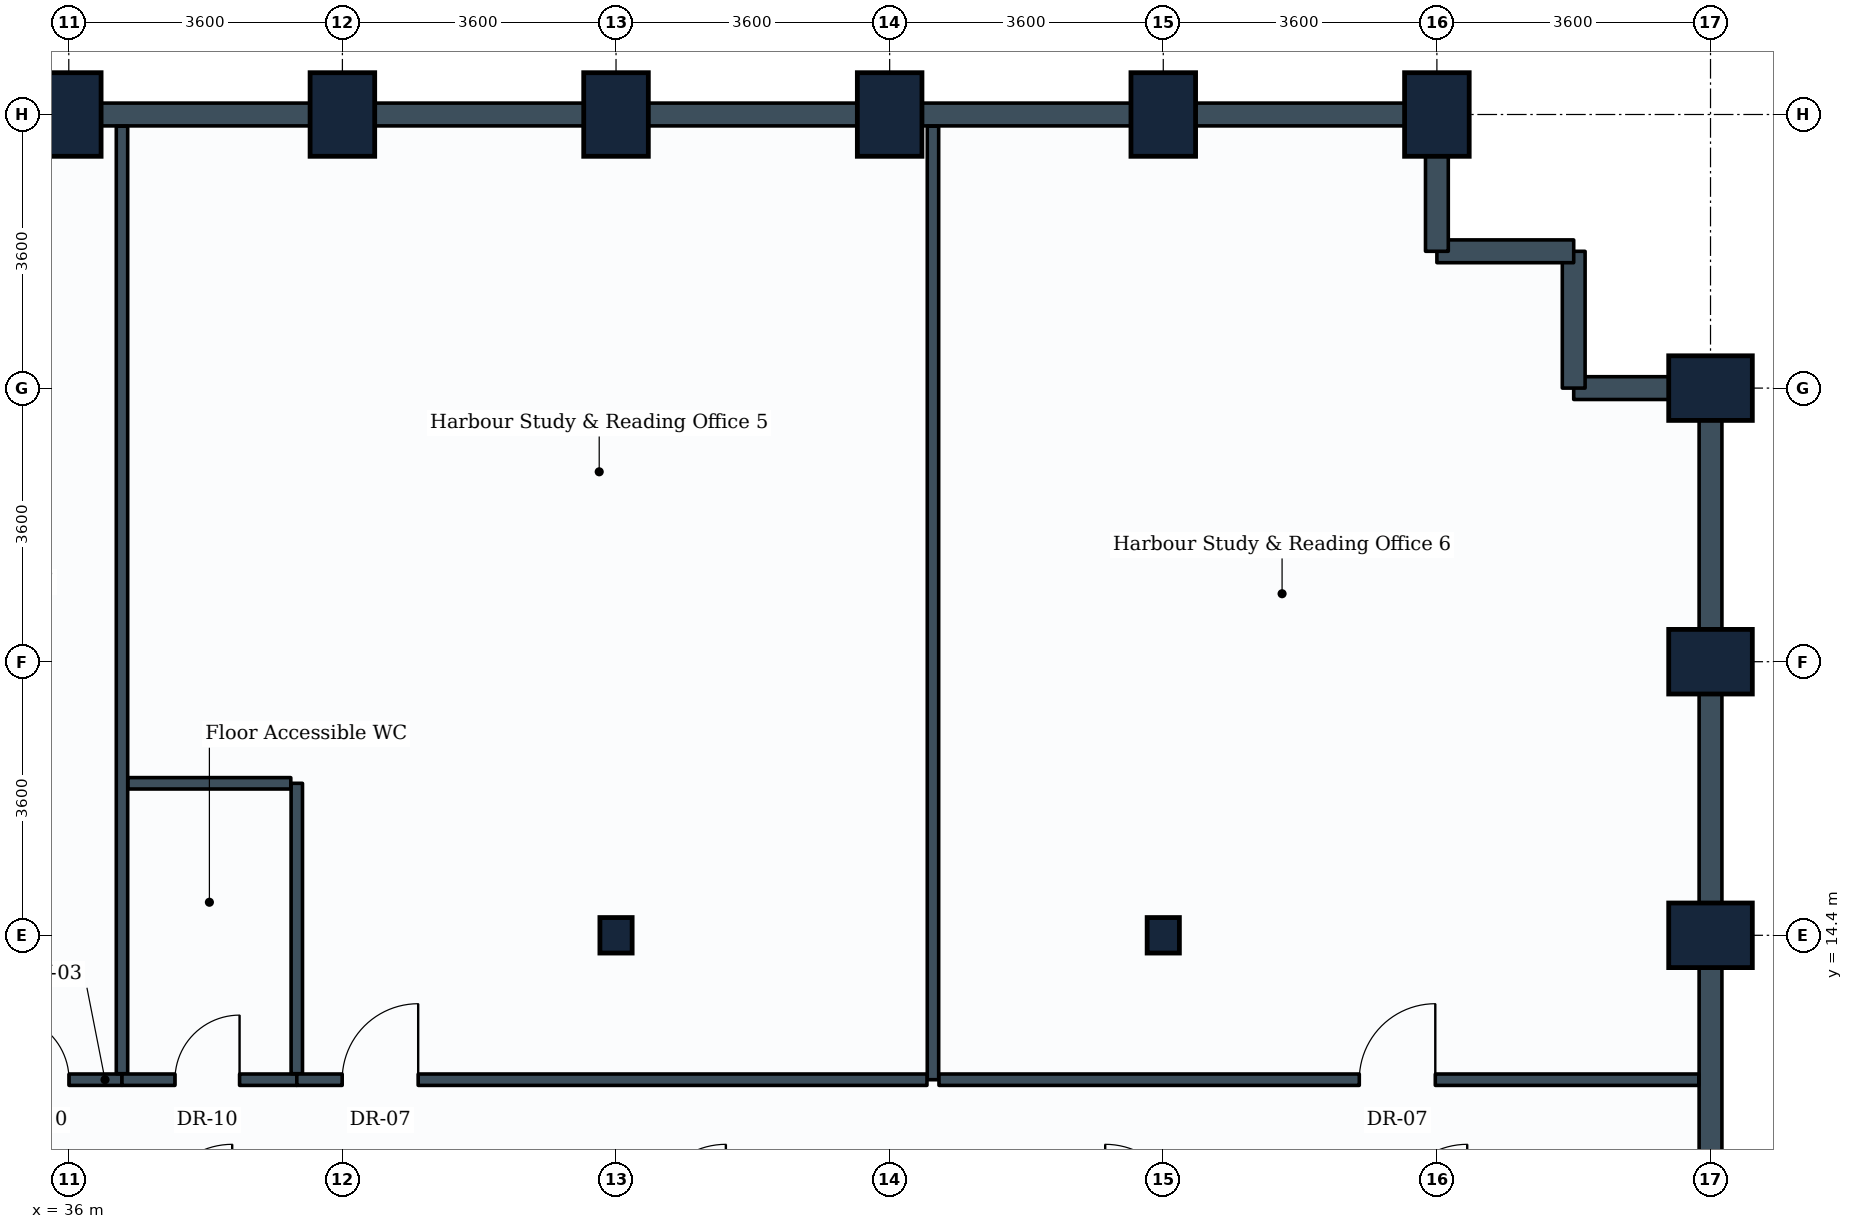
"""IFC4 building model, lengths in metres.
Left out: names, types, materials, properties, quantities, classifications, styles, units other than length and angle.
Written with IfcOpenShell. Run it as: python <this file> out.ifc"""

import sys

from ifc_helpers import new_model, si_unit, direction, frame, frame_2d, origin, origin_2d, place, context, subcontext, project, spatial, rectangle, i_section, extrude, element, fill, save


model = new_model("IFC4")
c1 = context("Model", 3, precision=1e-05, world=origin(), true_north=direction((0.0, 1.0)))
c2 = subcontext(c1, "Body", "Model", "MODEL_VIEW")
j1 = project(units=[si_unit("LENGTHUNIT", "METRE"), si_unit("PLANEANGLEUNIT", "RADIAN")], contexts=[c1])
p1 = place(None, origin())
s1 = spatial("IfcSite", under=j1, at=p1, CompositionType="ELEMENT")
p2 = place(p1, origin())
s2 = spatial("IfcBuilding", under=s1, at=p2, CompositionType="ELEMENT")
p3 = place(p2, frame((0.0, 0.0, 91.8)))
s3 = spatial("IfcBuildingStorey", under=s2, at=p3, CompositionType="ELEMENT", Elevation=91.8)
for number, where, z_axis, x_axis in (
    (1, (36.0, 25.2, 0.0), (0.0, 0.0, 1.0), (1.0, 0.0, 0.0)),
    (2, (39.6, 25.2, 0.0), (0.0, 0.0, 1.0), (1.0, 0.0, 0.0)),
):
    element("IfcColumn", number, at=place(p3, frame(where, z_axis=z_axis, x_axis=x_axis)), inside=s3, PredefinedType="COLUMN", context=c2, shape_type="SweptSolid", body=[
        extrude(rectangle(XDim=0.85, YDim=1.1, at=origin_2d()), origin(), (0.0, 0.0, 1.0), 3.9),
    ])
p4 = place(p3, frame((43.2, 14.4, 0.0), z_axis=(0.0, 0.0, 1.0), x_axis=(1.0, 0.0, 0.0)))
e3 = element("IfcColumn", 3, at=p4, inside=s3, PredefinedType="COLUMN", context=c2, shape_type="SweptSolid", body=[
    extrude(i_section(OverallWidth=0.424, OverallDepth=0.467, WebThickness=0.033, FlangeThickness=0.053, FilletRadius=0.015, at=origin_2d()), origin(), (0.0, 0.0, 1.0), 3.9),
])
for number, where, z_axis, x_axis in (
    (4, (43.2, 25.2, 0.0), (0.0, 0.0, 1.0), (1.0, 0.0, 0.0)),
    (5, (46.8, 25.2, 0.0), (0.0, 0.0, 1.0), (1.0, 0.0, 0.0)),
):
    element("IfcColumn", number, at=place(p3, frame(where, z_axis=z_axis, x_axis=x_axis)), inside=s3, PredefinedType="COLUMN", context=c2, shape_type="SweptSolid", body=[
        extrude(rectangle(XDim=0.85, YDim=1.1, at=origin_2d()), origin(), (0.0, 0.0, 1.0), 3.9),
    ])
p5 = place(p3, frame((50.4, 14.4, 0.0), z_axis=(0.0, 0.0, 1.0), x_axis=(1.0, 0.0, 0.0)))
e6 = element("IfcColumn", 6, at=p5, inside=s3, PredefinedType="COLUMN", context=c2, shape_type="SweptSolid", body=[
    extrude(i_section(OverallWidth=0.424, OverallDepth=0.467, WebThickness=0.033, FlangeThickness=0.053, FilletRadius=0.015, at=origin_2d()), origin(), (0.0, 0.0, 1.0), 3.9),
])
for number, where, z_axis, x_axis in (
    (7, (50.4, 25.2, 0.0), (0.0, 0.0, 1.0), (1.0, 0.0, 0.0)),
    (8, (54.0, 25.2, 0.0), (0.0, 0.0, 1.0), (1.0, 0.0, 0.0)),
    (9, (57.6, 14.4, 0.0), (0.0, 0.0, 1.0), (0.0, 1.0, 0.0)),
    (10, (57.6, 18.0, 0.0), (0.0, 0.0, 1.0), (0.0, 1.0, 0.0)),
    (11, (57.6, 21.6, 0.0), (0.0, 0.0, 1.0), (0.0, 1.0, 0.0)),
):
    element("IfcColumn", number, at=place(p3, frame(where, z_axis=z_axis, x_axis=x_axis)), inside=s3, PredefinedType="COLUMN", context=c2, shape_type="SweptSolid", body=[
        extrude(rectangle(XDim=0.85, YDim=1.1, at=origin_2d()), origin(), (0.0, 0.0, 1.0), 3.9),
    ])
p6 = place(p3, frame((57.6, 14.4, 0.0), z_axis=(0.0, 0.0, 1.0), x_axis=(0.0, -1.0, 0.0)))
e12 = element("IfcWall", 12, at=p6, inside=s3, PredefinedType="STANDARD", context=c2, shape_type="SweptSolid", body=[
    extrude(rectangle(XDim=3.6, YDim=0.3, at=frame_2d((1.8, 0.0))), origin(), (0.0, 0.0, 1.0), 2.93),
])
for number, where, z_axis, x_axis in (
    (13, (57.6, 18.0, 0.0), (0.0, 0.0, 1.0), (0.0, -1.0, 0.0)),
    (14, (57.6, 21.6, 0.0), (0.0, 0.0, 1.0), (0.0, -1.0, 0.0)),
):
    element("IfcWall", number, at=place(p3, frame(where, z_axis=z_axis, x_axis=x_axis)), inside=s3, PredefinedType="STANDARD", context=c2, shape_type="SweptSolid", body=[
        extrude(rectangle(XDim=3.6, YDim=0.3, at=frame_2d((1.8, 0.0))), origin(), (0.0, 0.0, 1.0), 2.93),
    ])
p7 = place(p3, frame((55.8, 21.6, 0.0), z_axis=(0.0, 0.0, 1.0), x_axis=(1.0, 0.0, 0.0)))
e15 = element("IfcWall", 15, at=p7, inside=s3, PredefinedType="STANDARD", context=c2, shape_type="SweptSolid", body=[
    extrude(rectangle(XDim=1.8, YDim=0.3, at=frame_2d((0.9, 0.0))), origin(), (0.0, 0.0, 1.0), 2.93),
])
p8 = place(p3, frame((55.8, 23.4, 0.0), z_axis=(0.0, 0.0, 1.0), x_axis=(0.0, -1.0, 0.0)))
e16 = element("IfcWall", 16, at=p8, inside=s3, PredefinedType="STANDARD", context=c2, shape_type="SweptSolid", body=[
    extrude(rectangle(XDim=1.8, YDim=0.3, at=frame_2d((0.9, 0.0))), origin(), (0.0, 0.0, 1.0), 3.635),
])
p9 = place(p3, frame((54.0, 23.4, 0.0), z_axis=(0.0, 0.0, 1.0), x_axis=(1.0, 0.0, 0.0)))
e17 = element("IfcWall", 17, at=p9, inside=s3, PredefinedType="STANDARD", context=c2, shape_type="SweptSolid", body=[
    extrude(rectangle(XDim=1.8, YDim=0.3, at=frame_2d((0.9, 0.0))), origin(), (0.0, 0.0, 1.0), 3.635),
])
p10 = place(p3, frame((54.0, 25.2, 0.0), z_axis=(0.0, 0.0, 1.0), x_axis=(0.0, -1.0, 0.0)))
e18 = element("IfcWall", 18, at=p10, inside=s3, PredefinedType="STANDARD", context=c2, shape_type="SweptSolid", body=[
    extrude(rectangle(XDim=1.8, YDim=0.3, at=frame_2d((0.9, 0.0))), origin(), (0.0, 0.0, 1.0), 2.93),
])
p11 = place(p3, frame((50.4, 25.2, 0.0), z_axis=(0.0, 0.0, 1.0), x_axis=(1.0, 0.0, 0.0)))
e19 = element("IfcWall", 19, at=p11, inside=s3, PredefinedType="STANDARD", context=c2, shape_type="SweptSolid", body=[
    extrude(rectangle(XDim=3.6, YDim=0.3, at=frame_2d((1.8, 0.0))), origin(), (0.0, 0.0, 1.0), 2.93),
])
p12 = place(p3, frame((46.8, 25.2, 0.0), z_axis=(0.0, 0.0, 1.0), x_axis=(1.0, 0.0, 0.0)))
e20 = element("IfcWall", 20, at=p12, inside=s3, PredefinedType="STANDARD", context=c2, shape_type="SweptSolid", body=[
    extrude(rectangle(XDim=3.6, YDim=0.3, at=frame_2d((1.8, 0.0))), origin(), (0.0, 0.0, 1.0), 2.93),
])
p13 = place(p3, frame((43.2, 25.2, 0.0), z_axis=(0.0, 0.0, 1.0), x_axis=(1.0, 0.0, 0.0)))
e21 = element("IfcWall", 21, at=p13, inside=s3, PredefinedType="STANDARD", context=c2, shape_type="SweptSolid", body=[
    extrude(rectangle(XDim=3.6, YDim=0.3, at=frame_2d((1.8, 0.0))), origin(), (0.0, 0.0, 1.0), 2.93),
])
p14 = place(p3, frame((39.6, 25.2, 0.0), z_axis=(0.0, 0.0, 1.0), x_axis=(1.0, 0.0, 0.0)))
e22 = element("IfcWall", 22, at=p14, inside=s3, PredefinedType="STANDARD", context=c2, shape_type="SweptSolid", body=[
    extrude(rectangle(XDim=3.6, YDim=0.3, at=frame_2d((1.8, 0.0))), origin(), (0.0, 0.0, 1.0), 2.93),
])
for number, where, z_axis, x_axis in (
    (23, (36.0, 25.2, 0.0), (0.0, 0.0, 1.0), (1.0, 0.0, 0.0)),
    (24, (32.4, 25.2, 0.0), (0.0, 0.0, 1.0), (1.0, 0.0, 0.0)),
):
    element("IfcWall", number, at=place(p3, frame(where, z_axis=z_axis, x_axis=x_axis)), inside=s3, PredefinedType="STANDARD", context=c2, shape_type="SweptSolid", body=[
        extrude(rectangle(XDim=3.6, YDim=0.3, at=frame_2d((1.8, 0.0))), origin(), (0.0, 0.0, 1.0), 2.93),
    ])
p15 = place(p3, frame((34.479, 12.5, 0.0), z_axis=(0.0, 0.0, 1.0), x_axis=(1.0, 0.0, 0.0)))
e25 = element("IfcWall", 25, at=p15, inside=s3, PredefinedType="PARTITIONING", context=c2, shape_type="SweptSolid", body=[
    extrude(rectangle(XDim=2.221, YDim=0.15, at=frame_2d((1.11, 0.0))), origin(), (0.0, 0.0, 1.0), 3.18),
])
p16 = place(p15, frame((0.674, 0.0, 0.0)))
e26 = element("IfcOpeningElement", 26, at=p16, cuts=e25, PredefinedType="OPENING", context=c2, shape_type="SweptSolid", body=[
    extrude(rectangle(XDim=0.85, YDim=2.1, at=frame_2d((0.425, 1.05))), frame((0.0, 0.085, 0.0), z_axis=(0.0, -1.0, 0.0), x_axis=(1.0, 0.0, 0.0)), (0.0, 0.0, 1.0), 0.17),
])
p17 = place(p3, frame((36.7, 12.579, 0.0), z_axis=(0.0, 0.0, 1.0), x_axis=(0.0, 1.0, 0.0)))
e27 = element("IfcWall", 27, at=p17, inside=s3, PredefinedType="PARTITIONING", context=c2, shape_type="SweptSolid", body=[
    extrude(rectangle(XDim=12.467, YDim=0.15, at=frame_2d((6.233, 0.0))), origin(), (0.0, 0.0, 1.0), 2.93),
])
p18 = place(p3, frame((36.7, 12.5, 0.0), z_axis=(0.0, 0.0, 1.0), x_axis=(1.0, 0.0, 0.0)))
e28 = element("IfcWall", 28, at=p18, inside=s3, PredefinedType="PARTITIONING", context=c2, shape_type="SweptSolid", body=[
    extrude(rectangle(XDim=2.3, YDim=0.15, at=frame_2d((1.15, 0.0))), origin(), (0.0, 0.0, 1.0), 3.635),
])
p19 = place(p18, frame((0.697, 0.0, 0.0)))
e29 = element("IfcOpeningElement", 29, at=p19, cuts=e28, PredefinedType="OPENING", context=c2, shape_type="SweptSolid", body=[
    extrude(rectangle(XDim=0.85, YDim=2.1, at=frame_2d((0.425, 1.05))), frame((0.0, 0.085, 0.0), z_axis=(0.0, -1.0, 0.0), x_axis=(1.0, 0.0, 0.0)), (0.0, 0.0, 1.0), 0.17),
])
p20 = place(p3, frame((39.0, 12.579, 0.0), z_axis=(0.0, 0.0, 1.0), x_axis=(0.0, 1.0, 0.0)))
e30 = element("IfcWall", 30, at=p20, inside=s3, PredefinedType="PARTITIONING", context=c2, shape_type="SweptSolid", body=[
    extrude(rectangle(XDim=3.821, YDim=0.15, at=frame_2d((1.91, 0.0))), origin(), (0.0, 0.0, 1.0), 3.18),
])
p21 = place(p3, frame((36.779, 16.4, 0.0), z_axis=(0.0, 0.0, 1.0), x_axis=(1.0, 0.0, 0.0)))
e31 = element("IfcWall", 31, at=p21, inside=s3, PredefinedType="PARTITIONING", context=c2, shape_type="SweptSolid", body=[
    extrude(rectangle(XDim=2.142, YDim=0.15, at=frame_2d((1.071, 0.0))), origin(), (0.0, 0.0, 1.0), 3.635),
])
p22 = place(p3, frame((47.37, 12.5, 0.0), z_axis=(0.0, 0.0, 1.0), x_axis=(0.0, 1.0, 0.0)))
e32 = element("IfcWall", 32, at=p22, inside=s3, PredefinedType="PARTITIONING", context=c2, shape_type="SweptSolid", body=[
    extrude(rectangle(XDim=12.546, YDim=0.15, at=frame_2d((6.273, 0.0))), origin(), (0.0, 0.0, 1.0), 2.93),
])
p23 = place(p3, frame((39.0, 12.5, 0.0), z_axis=(0.0, 0.0, 1.0), x_axis=(1.0, 0.0, 0.0)))
e33 = element("IfcWall", 33, at=p23, inside=s3, PredefinedType="PARTITIONING", context=c2, shape_type="SweptSolid", body=[
    extrude(rectangle(XDim=8.291, YDim=0.15, at=frame_2d((4.146, 0.0))), origin(), (0.0, 0.0, 1.0), 3.19),
])
p24 = place(p23, frame((0.597, 0.0, 0.0)))
e34 = element("IfcOpeningElement", 34, at=p24, cuts=e33, PredefinedType="OPENING", context=c2, shape_type="SweptSolid", body=[
    extrude(rectangle(XDim=1.0, YDim=2.1, at=frame_2d((0.5, 1.05))), frame((0.0, 0.085, 0.0), z_axis=(0.0, -1.0, 0.0), x_axis=(1.0, 0.0, 0.0)), (0.0, 0.0, 1.0), 0.17),
])
p25 = place(p3, frame((47.449, 12.5, 0.0), z_axis=(0.0, 0.0, 1.0), x_axis=(1.0, 0.0, 0.0)))
e35 = element("IfcWall", 35, at=p25, inside=s3, PredefinedType="PARTITIONING", context=c2, shape_type="SweptSolid", body=[
    extrude(rectangle(XDim=9.997, YDim=0.15, at=frame_2d((4.999, 0.0))), origin(), (0.0, 0.0, 1.0), 2.93),
])
p26 = place(p25, frame((5.53, 0.0, 0.0)))
e36 = element("IfcOpeningElement", 36, at=p26, cuts=e35, PredefinedType="OPENING", context=c2, shape_type="SweptSolid", body=[
    extrude(rectangle(XDim=1.0, YDim=2.1, at=frame_2d((0.5, 1.05))), frame((0.0, 0.085, 0.0), z_axis=(0.0, -1.0, 0.0), x_axis=(1.0, 0.0, 0.0)), (0.0, 0.0, 1.0), 0.17),
])
p27 = place(p16, origin())
e37 = element("IfcDoor", 37, at=p27, inside=s3, OperationType="SINGLE_SWING_LEFT", PredefinedType="DOOR", context=c2, shape_type="SweptSolid", body=[
    extrude(rectangle(XDim=0.85, YDim=2.1, at=frame_2d((0.425, 1.05))), frame((0.0, 0.025, 0.0), z_axis=(0.0, -1.0, 0.0), x_axis=(1.0, 0.0, 0.0)), (0.0, 0.0, 1.0), 0.05),
])
fill(e26, e37)
p28 = place(p19, origin())
e38 = element("IfcDoor", 38, at=p28, inside=s3, OperationType="SINGLE_SWING_RIGHT", PredefinedType="DOOR", context=c2, shape_type="SweptSolid", body=[
    extrude(rectangle(XDim=0.85, YDim=2.1, at=frame_2d((0.425, 1.05))), frame((0.0, 0.025, 0.0), z_axis=(0.0, -1.0, 0.0), x_axis=(1.0, 0.0, 0.0)), (0.0, 0.0, 1.0), 0.05),
])
fill(e29, e38)
p29 = place(p24, origin())
e39 = element("IfcDoor", 39, at=p29, inside=s3, OperationType="SINGLE_SWING_RIGHT", PredefinedType="DOOR", context=c2, shape_type="SweptSolid", body=[
    extrude(rectangle(XDim=1.0, YDim=2.1, at=frame_2d((0.5, 1.05))), frame((0.0, 0.025, 0.0), z_axis=(0.0, -1.0, 0.0), x_axis=(1.0, 0.0, 0.0)), (0.0, 0.0, 1.0), 0.05),
])
fill(e34, e39)
p30 = place(p26, origin())
e40 = element("IfcDoor", 40, at=p30, inside=s3, OperationType="SINGLE_SWING_RIGHT", PredefinedType="DOOR", context=c2, shape_type="SweptSolid", body=[
    extrude(rectangle(XDim=1.0, YDim=2.1, at=frame_2d((0.5, 1.05))), frame((0.0, 0.025, 0.0), z_axis=(0.0, -1.0, 0.0), x_axis=(1.0, 0.0, 0.0)), (0.0, 0.0, 1.0), 0.05),
])
fill(e36, e40)
save(model, sys.argv[1])
